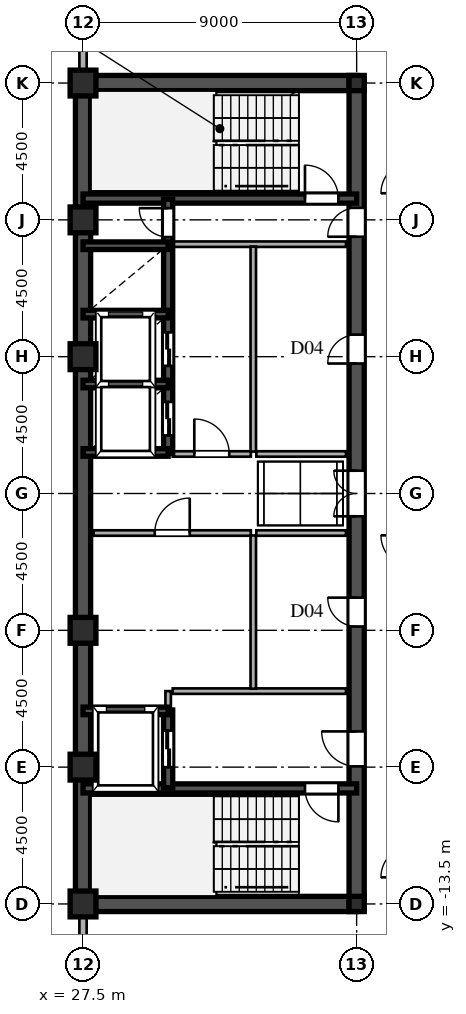
"""IFC4 building model, lengths in metres.
Left out: names, types, materials, properties, quantities, classifications, styles, units other than length and angle.
Written with IfcOpenShell. Run it as: python <this file> out.ifc"""

import sys

from ifc_helpers import new_model, si_unit, direction, frame, frame_2d, origin, origin_2d, place, context, subcontext, project, spatial, rectangle, hollow_rectangle, i_section, extrude, source, transform, mapped, element, fill, save


model = new_model("IFC4")
c1 = context("Model", 3, precision=1e-05, world=origin(), true_north=direction((0.0, 1.0)))
c2 = subcontext(c1, "Body", "Model", "MODEL_VIEW")
j1 = project(units=[si_unit("LENGTHUNIT", "METRE"), si_unit("PLANEANGLEUNIT", "RADIAN")], contexts=[c1])
p1 = place(None, origin())
s1 = spatial("IfcSite", under=j1, at=p1, CompositionType="ELEMENT")
p2 = place(p1, origin())
s2 = spatial("IfcBuilding", under=s1, at=p2, CompositionType="ELEMENT")
p3 = place(p2, frame((0.0, 0.0, 213.9)))
s3 = spatial("IfcBuildingStorey", under=s2, at=p3, CompositionType="ELEMENT", Elevation=213.9)
m1 = source(origin(), c2, "Body", "SweptSolid", [
    extrude(hollow_rectangle(XDim=0.85, YDim=0.85, WallThickness=0.036, at=origin_2d()), origin(), (0.0, 0.0, 1.0), 3.6),
])
for number, where, z_axis, x_axis in (
    (1, (27.5, -13.5, 0.0), (0.0, 0.0, 1.0), (1.0, 0.0, 0.0)),
    (2, (27.5, -9.0, 0.0), (0.0, 0.0, 1.0), (1.0, 0.0, 0.0)),
    (3, (27.5, -4.5, 0.0), (0.0, 0.0, 1.0), (1.0, 0.0, 0.0)),
    (4, (27.5, 4.5, 0.0), (0.0, 0.0, 1.0), (1.0, 0.0, 0.0)),
    (5, (27.5, 9.0, 0.0), (0.0, 0.0, 1.0), (1.0, 0.0, 0.0)),
    (6, (27.5, 13.5, 0.0), (0.0, 0.0, 1.0), (1.0, 0.0, 0.0)),
):
    element("IfcColumn", number, at=place(p3, frame(where, z_axis=z_axis, x_axis=x_axis)), inside=s3, PredefinedType="COLUMN", context=c2, shape_type="MappedRepresentation", body=[
        mapped(m1, transform((0.0, 0.0, 0.0), scale=1.0)),
    ])
m2 = source(origin(), c2, "Body", "SweptSolid", [
    extrude(i_section(OverallWidth=0.5, OverallDepth=0.5, WebThickness=0.02, FlangeThickness=0.032, at=origin_2d()), origin(), (0.0, 0.0, 1.0), 3.6),
])
for number, where, z_axis, x_axis in (
    (7, (36.5, -13.5, 0.0), (0.0, 0.0, 1.0), (1.0, 0.0, 0.0)),
    (8, (36.5, 13.5, 0.0), (0.0, 0.0, 1.0), (1.0, 0.0, 0.0)),
):
    element("IfcColumn", number, at=place(p3, frame(where, z_axis=z_axis, x_axis=x_axis)), inside=s3, PredefinedType="COLUMN", context=c2, shape_type="MappedRepresentation", body=[
        mapped(m2, transform((0.0, 0.0, 0.0), scale=1.0)),
    ])
p4 = place(p3, frame((27.5, -15.98, 0.0), z_axis=(0.0, 0.0, 1.0), x_axis=(0.0, 1.0, 0.0)))
e9 = element("IfcWall", 9, at=p4, inside=s3, PredefinedType="SOLIDWALL", context=c2, shape_type="SweptSolid", body=[
    extrude(rectangle(XDim=1.605, YDim=0.24, at=frame_2d((0.803, 0.0))), origin(), (0.0, 0.0, 1.0), 3.38),
])
for number, where, z_axis, x_axis in (
    (10, (27.5, -14.375, 0.0), (0.0, 0.0, 1.0), (0.0, 1.0, 0.0)),
    (11, (27.5, 13.755, 0.0), (0.0, 0.0, 1.0), (0.0, 1.0, 0.0)),
):
    element("IfcWall", number, at=place(p3, frame(where, z_axis=z_axis, x_axis=x_axis)), inside=s3, PredefinedType="SOLIDWALL", context=c2, shape_type="SweptSolid", body=[
        extrude(rectangle(XDim=0.62, YDim=0.24, at=frame_2d((0.31, 0.0))), origin(), (0.0, 0.0, 1.0), 2.88),
    ])
p5 = place(p3, frame((27.5, 14.375, 0.0), z_axis=(0.0, 0.0, 1.0), x_axis=(0.0, 1.0, 0.0)))
e12 = element("IfcWall", 12, at=p5, inside=s3, PredefinedType="SOLIDWALL", context=c2, shape_type="SweptSolid", body=[
    extrude(rectangle(XDim=1.605, YDim=0.24, at=frame_2d((0.803, 0.0))), origin(), (0.0, 0.0, 1.0), 3.38),
])
for number, where, z_axis, x_axis in (
    (13, (27.5, -13.5, 0.0), (0.0, 0.0, 1.0), (0.0, 1.0, 0.0)),
    (14, (27.5, 1.3, 0.0), (0.0, 0.0, 1.0), (0.0, 1.0, 0.0)),
):
    element("IfcWall", number, at=place(p3, frame(where, z_axis=z_axis, x_axis=x_axis)), inside=s3, PredefinedType="SHEAR", context=c2, shape_type="SweptSolid", body=[
        extrude(rectangle(XDim=12.2, YDim=0.5, at=frame_2d((6.1, 0.0))), origin(), (0.0, 0.0, 1.0), 3.38),
    ])
p6 = place(p3, frame((27.5, -1.3, 0.0), z_axis=(0.0, 0.0, 1.0), x_axis=(0.0, 1.0, 0.0)))
e15 = element("IfcWall", 15, at=p6, inside=s3, PredefinedType="SHEAR", context=c2, shape_type="SweptSolid", body=[
    extrude(rectangle(XDim=2.6, YDim=0.5, at=frame_2d((1.3, 0.0))), origin(), (0.0, 0.0, 1.0), 3.38),
])
for number, where, z_axis, x_axis in (
    (16, (27.5, -13.5, 0.0), (0.0, 0.0, 1.0), (1.0, 0.0, 0.0)),
    (17, (27.5, 13.5, 0.0), (0.0, 0.0, 1.0), (1.0, 0.0, 0.0)),
):
    element("IfcWall", number, at=place(p3, frame(where, z_axis=z_axis, x_axis=x_axis)), inside=s3, PredefinedType="SHEAR", context=c2, shape_type="SweptSolid", body=[
        extrude(rectangle(XDim=9.0, YDim=0.5, at=frame_2d((4.5, 0.0))), origin(), (0.0, 0.0, 1.0), 3.38),
    ])
p7 = place(p3, frame((36.5, -13.65, 0.0), z_axis=(0.0, 0.0, 1.0), x_axis=(0.0, 1.0, 0.0)))
e18 = element("IfcWall", 18, at=p7, inside=s3, PredefinedType="SHEAR", context=c2, shape_type="SweptSolid", body=[
    extrude(rectangle(XDim=7.15, YDim=0.5, at=frame_2d((3.575, 0.0))), origin(), (0.0, 0.0, 1.0), 3.38),
])
p8 = place(p7, frame((4.675, 0.0, 0.0)))
e19 = element("IfcOpeningElement", 19, at=p8, cuts=e18, PredefinedType="OPENING", context=c2, shape_type="SweptSolid", body=[
    extrude(rectangle(XDim=1.15, YDim=2.2, at=frame_2d((0.575, 1.1))), frame((0.0, 0.26, 0.0), z_axis=(0.0, -1.0, 0.0), x_axis=(1.0, 0.0, 0.0)), (0.0, 0.0, 1.0), 0.52),
])
p9 = place(p3, frame((36.5, -1.3, 0.0), z_axis=(0.0, 0.0, 1.0), x_axis=(0.0, 1.0, 0.0)))
e20 = element("IfcWall", 20, at=p9, inside=s3, PredefinedType="SHEAR", context=c2, shape_type="SweptSolid", body=[
    extrude(rectangle(XDim=2.6, YDim=0.5, at=frame_2d((1.3, 0.0))), origin(), (0.0, 0.0, 1.0), 3.38),
])
p10 = place(p9, frame((0.55, 0.0, 0.0)))
e21 = element("IfcOpeningElement", 21, at=p10, cuts=e20, PredefinedType="OPENING", context=c2, shape_type="SweptSolid", body=[
    extrude(rectangle(XDim=1.5, YDim=2.3, at=frame_2d((0.75, 1.15))), frame((0.0, 0.26, 0.0), z_axis=(0.0, -1.0, 0.0), x_axis=(1.0, 0.0, 0.0)), (0.0, 0.0, 1.0), 0.52),
])
p11 = place(p3, frame((36.5, 8.2, 0.0), z_axis=(0.0, 0.0, 1.0), x_axis=(0.0, 1.0, 0.0)))
e22 = element("IfcWall", 22, at=p11, inside=s3, PredefinedType="SHEAR", context=c2, shape_type="SweptSolid", body=[
    extrude(rectangle(XDim=5.45, YDim=0.5, at=frame_2d((2.725, 0.0))), origin(), (0.0, 0.0, 1.0), 3.38),
])
p12 = place(p11, frame((0.245, 0.0, 0.0)))
e23 = element("IfcOpeningElement", 23, at=p12, cuts=e22, PredefinedType="OPENING", context=c2, shape_type="SweptSolid", body=[
    extrude(rectangle(XDim=0.95, YDim=2.15, at=frame_2d((0.475, 1.075))), frame((0.0, 0.26, 0.0), z_axis=(0.0, -1.0, 0.0), x_axis=(1.0, 0.0, 0.0)), (0.0, 0.0, 1.0), 0.52),
])
p13 = place(p3, frame((36.5, -6.5, 0.0), z_axis=(0.0, 0.0, 1.0), x_axis=(0.0, 1.0, 0.0)))
e24 = element("IfcWall", 24, at=p13, inside=s3, PredefinedType="SHEAR", context=c2, shape_type="SweptSolid", body=[
    extrude(rectangle(XDim=5.2, YDim=0.5, at=frame_2d((2.6, 0.0))), origin(), (0.0, 0.0, 1.0), 3.38),
])
p14 = place(p13, frame((2.125, 0.0, 0.0)))
e25 = element("IfcOpeningElement", 25, at=p14, cuts=e24, PredefinedType="OPENING", context=c2, shape_type="SweptSolid", body=[
    extrude(rectangle(XDim=0.95, YDim=2.15, at=frame_2d((0.475, 1.075))), frame((0.0, 0.26, 0.0), z_axis=(0.0, -1.0, 0.0), x_axis=(1.0, 0.0, 0.0)), (0.0, 0.0, 1.0), 0.52),
])
p15 = place(p3, frame((36.5, 1.3, 0.0), z_axis=(0.0, 0.0, 1.0), x_axis=(0.0, 1.0, 0.0)))
e26 = element("IfcWall", 26, at=p15, inside=s3, PredefinedType="SHEAR", context=c2, shape_type="SweptSolid", body=[
    extrude(rectangle(XDim=6.9, YDim=0.5, at=frame_2d((3.45, 0.0))), origin(), (0.0, 0.0, 1.0), 3.38),
])
p16 = place(p15, frame((2.975, 0.0, 0.0)))
e27 = element("IfcOpeningElement", 27, at=p16, cuts=e26, PredefinedType="OPENING", context=c2, shape_type="SweptSolid", body=[
    extrude(rectangle(XDim=0.95, YDim=2.15, at=frame_2d((0.475, 1.075))), frame((0.0, 0.26, 0.0), z_axis=(0.0, -1.0, 0.0), x_axis=(1.0, 0.0, 0.0)), (0.0, 0.0, 1.0), 0.52),
])
p17 = place(p3, frame((27.5, -9.7, 0.0), z_axis=(0.0, 0.0, 1.0), x_axis=(1.0, 0.0, 0.0)))
e28 = element("IfcWall", 28, at=p17, inside=s3, PredefinedType="SHEAR", context=c2, shape_type="SweptSolid", body=[
    extrude(rectangle(XDim=9.0, YDim=0.3, at=frame_2d((4.5, 0.0))), origin(), (0.0, 0.0, 1.0), 3.38),
])
p18 = place(p17, frame((7.3, 0.0, 0.0)))
e29 = element("IfcOpeningElement", 29, at=p18, cuts=e28, PredefinedType="OPENING", context=c2, shape_type="SweptSolid", body=[
    extrude(rectangle(XDim=1.1, YDim=2.2, at=frame_2d((0.55, 1.1))), frame((0.0, 0.16, 0.0), z_axis=(0.0, -1.0, 0.0), x_axis=(1.0, 0.0, 0.0)), (0.0, 0.0, 1.0), 0.32),
])
p19 = place(p3, frame((27.5, 9.7, 0.0), z_axis=(0.0, 0.0, 1.0), x_axis=(1.0, 0.0, 0.0)))
e30 = element("IfcWall", 30, at=p19, inside=s3, PredefinedType="SHEAR", context=c2, shape_type="SweptSolid", body=[
    extrude(rectangle(XDim=9.0, YDim=0.3, at=frame_2d((4.5, 0.0))), origin(), (0.0, 0.0, 1.0), 3.38),
])
p20 = place(p19, frame((7.3, 0.0, 0.0)))
e31 = element("IfcOpeningElement", 31, at=p20, cuts=e30, PredefinedType="OPENING", context=c2, shape_type="SweptSolid", body=[
    extrude(rectangle(XDim=1.1, YDim=2.2, at=frame_2d((0.55, 1.1))), frame((0.0, 0.16, 0.0), z_axis=(0.0, -1.0, 0.0), x_axis=(1.0, 0.0, 0.0)), (0.0, 0.0, 1.0), 0.32),
])
for number, where, z_axis, x_axis in (
    (32, (27.5, -7.15, 0.0), (0.0, 0.0, 1.0), (1.0, 0.0, 0.0)),
    (33, (27.5, 1.35, 0.0), (0.0, 0.0, 1.0), (1.0, 0.0, 0.0)),
    (34, (27.5, 3.6, 0.0), (0.0, 0.0, 1.0), (1.0, 0.0, 0.0)),
    (35, (27.5, 5.9, 0.0), (0.0, 0.0, 1.0), (1.0, 0.0, 0.0)),
    (36, (27.5, 8.15, 0.0), (0.0, 0.0, 1.0), (1.0, 0.0, 0.0)),
):
    element("IfcWall", number, at=place(p3, frame(where, z_axis=z_axis, x_axis=x_axis)), inside=s3, PredefinedType="SHEAR", context=c2, shape_type="SweptSolid", body=[
        extrude(rectangle(XDim=2.8, YDim=0.25, at=frame_2d((1.4, 0.0))), origin(), (0.0, 0.0, 1.0), 3.38),
    ])
p21 = place(p3, frame((30.3, -9.68, 0.0), z_axis=(0.0, 0.0, 1.0), x_axis=(0.0, 1.0, 0.0)))
e37 = element("IfcWall", 37, at=p21, inside=s3, PredefinedType="SHEAR", context=c2, shape_type="SweptSolid", body=[
    extrude(rectangle(XDim=2.56, YDim=0.3, at=frame_2d((1.28, 0.0))), origin(), (0.0, 0.0, 1.0), 3.38),
])
p22 = place(p21, frame((0.68, 0.0, 0.0)))
e38 = element("IfcOpeningElement", 38, at=p22, cuts=e37, PredefinedType="OPENING", context=c2, shape_type="SweptSolid", body=[
    extrude(rectangle(XDim=1.2, YDim=2.25, at=frame_2d((0.6, 1.125))), frame((0.0, 0.16, 0.0), z_axis=(0.0, -1.0, 0.0), x_axis=(1.0, 0.0, 0.0)), (0.0, 0.0, 1.0), 0.32),
])
p23 = place(p3, frame((30.3, 1.32, 0.0), z_axis=(0.0, 0.0, 1.0), x_axis=(0.0, 1.0, 0.0)))
e39 = element("IfcWall", 39, at=p23, inside=s3, PredefinedType="SHEAR", context=c2, shape_type="SweptSolid", body=[
    extrude(rectangle(XDim=2.28, YDim=0.3, at=frame_2d((1.14, 0.0))), origin(), (0.0, 0.0, 1.0), 3.38),
])
p24 = place(p23, frame((0.59, 0.0, 0.0)))
e40 = element("IfcOpeningElement", 40, at=p24, cuts=e39, PredefinedType="OPENING", context=c2, shape_type="SweptSolid", body=[
    extrude(rectangle(XDim=1.1, YDim=2.2, at=frame_2d((0.55, 1.1))), frame((0.0, 0.16, 0.0), z_axis=(0.0, -1.0, 0.0), x_axis=(1.0, 0.0, 0.0)), (0.0, 0.0, 1.0), 0.32),
])
p25 = place(p3, frame((30.3, 3.6, 0.0), z_axis=(0.0, 0.0, 1.0), x_axis=(0.0, 1.0, 0.0)))
e41 = element("IfcWall", 41, at=p25, inside=s3, PredefinedType="SHEAR", context=c2, shape_type="SweptSolid", body=[
    extrude(rectangle(XDim=2.3, YDim=0.3, at=frame_2d((1.15, 0.0))), origin(), (0.0, 0.0, 1.0), 3.38),
])
p26 = place(p25, frame((0.6, 0.0, 0.0)))
e42 = element("IfcOpeningElement", 42, at=p26, cuts=e41, PredefinedType="OPENING", context=c2, shape_type="SweptSolid", body=[
    extrude(rectangle(XDim=1.1, YDim=2.2, at=frame_2d((0.55, 1.1))), frame((0.0, 0.16, 0.0), z_axis=(0.0, -1.0, 0.0), x_axis=(1.0, 0.0, 0.0)), (0.0, 0.0, 1.0), 0.32),
])
p27 = place(p3, frame((30.3, 5.9, 0.0), z_axis=(0.0, 0.0, 1.0), x_axis=(0.0, 1.0, 0.0)))
e43 = element("IfcWall", 43, at=p27, inside=s3, PredefinedType="SHEAR", context=c2, shape_type="SweptSolid", body=[
    extrude(rectangle(XDim=2.25, YDim=0.3, at=frame_2d((1.125, 0.0))), origin(), (0.0, 0.0, 1.0), 3.38),
])
p28 = place(p3, frame((30.3, 8.15, 0.0), z_axis=(0.0, 0.0, 1.0), x_axis=(0.0, 1.0, 0.0)))
e44 = element("IfcWall", 44, at=p28, inside=s3, PredefinedType="SHEAR", context=c2, shape_type="SweptSolid", body=[
    extrude(rectangle(XDim=1.53, YDim=0.3, at=frame_2d((0.765, 0.0))), origin(), (0.0, 0.0, 1.0), 3.38),
])
p29 = place(p28, frame((0.285, 0.0, 0.0)))
e45 = element("IfcOpeningElement", 45, at=p29, cuts=e44, PredefinedType="OPENING", context=c2, shape_type="SweptSolid", body=[
    extrude(rectangle(XDim=0.95, YDim=2.15, at=frame_2d((0.475, 1.075))), frame((0.0, 0.16, 0.0), z_axis=(0.0, -1.0, 0.0), x_axis=(1.0, 0.0, 0.0)), (0.0, 0.0, 1.0), 0.32),
])
p30 = place(p3, frame((30.45, -6.5, 0.0), z_axis=(0.0, 0.0, 1.0), x_axis=(1.0, 0.0, 0.0)))
e46 = element("IfcWall", 46, at=p30, inside=s3, PredefinedType="PARTITIONING", context=c2, shape_type="SweptSolid", body=[
    extrude(rectangle(XDim=5.7, YDim=0.18, at=frame_2d((2.85, 0.0))), origin(), (0.0, 0.0, 1.0), 3.38),
])
p31 = place(p3, frame((30.3, -7.12, 0.0), z_axis=(0.0, 0.0, 1.0), x_axis=(0.0, 1.0, 0.0)))
e47 = element("IfcWall", 47, at=p31, inside=s3, PredefinedType="PARTITIONING", context=c2, shape_type="SweptSolid", body=[
    extrude(rectangle(XDim=0.62, YDim=0.18, at=frame_2d((0.31, 0.0))), origin(), (0.0, 0.0, 1.0), 3.38),
])
p32 = place(p3, frame((30.45, 8.2, 0.0), z_axis=(0.0, 0.0, 1.0), x_axis=(1.0, 0.0, 0.0)))
e48 = element("IfcWall", 48, at=p32, inside=s3, PredefinedType="PARTITIONING", context=c2, shape_type="SweptSolid", body=[
    extrude(rectangle(XDim=5.7, YDim=0.18, at=frame_2d((2.85, 0.0))), origin(), (0.0, 0.0, 1.0), 3.38),
])
p33 = place(p3, frame((33.1, -6.42, 0.0), z_axis=(0.0, 0.0, 1.0), x_axis=(0.0, 1.0, 0.0)))
e49 = element("IfcWall", 49, at=p33, inside=s3, PredefinedType="PARTITIONING", context=c2, shape_type="SweptSolid", body=[
    extrude(rectangle(XDim=5.04, YDim=0.18, at=frame_2d((2.52, 0.0))), origin(), (0.0, 0.0, 1.0), 3.38),
])
p34 = place(p3, frame((33.1, 1.38, 0.0), z_axis=(0.0, 0.0, 1.0), x_axis=(0.0, 1.0, 0.0)))
e50 = element("IfcWall", 50, at=p34, inside=s3, PredefinedType="PARTITIONING", context=c2, shape_type="SweptSolid", body=[
    extrude(rectangle(XDim=6.74, YDim=0.18, at=frame_2d((3.37, 0.0))), origin(), (0.0, 0.0, 1.0), 3.38),
])
p35 = place(p3, frame((27.85, -1.3, 0.0), z_axis=(0.0, 0.0, 1.0), x_axis=(1.0, 0.0, 0.0)))
e51 = element("IfcWall", 51, at=p35, inside=s3, PredefinedType="PARTITIONING", context=c2, shape_type="SweptSolid", body=[
    extrude(rectangle(XDim=5.17, YDim=0.18, at=frame_2d((2.585, 0.0))), origin(), (0.0, 0.0, 1.0), 3.38),
])
p36 = place(p35, frame((2.01, 0.0, 0.0)))
e52 = element("IfcOpeningElement", 52, at=p36, cuts=e51, PredefinedType="OPENING", context=c2, shape_type="SweptSolid", body=[
    extrude(rectangle(XDim=1.15, YDim=2.2, at=frame_2d((0.575, 1.1))), frame((0.0, 0.1, 0.0), z_axis=(0.0, -1.0, 0.0), x_axis=(1.0, 0.0, 0.0)), (0.0, 0.0, 1.0), 0.2),
])
p37 = place(p3, frame((30.45, 1.3, 0.0), z_axis=(0.0, 0.0, 1.0), x_axis=(1.0, 0.0, 0.0)))
e53 = element("IfcWall", 53, at=p37, inside=s3, PredefinedType="PARTITIONING", context=c2, shape_type="SweptSolid", body=[
    extrude(rectangle(XDim=2.57, YDim=0.18, at=frame_2d((1.285, 0.0))), origin(), (0.0, 0.0, 1.0), 3.38),
])
p38 = place(p37, frame((0.71, 0.0, 0.0)))
e54 = element("IfcOpeningElement", 54, at=p38, cuts=e53, PredefinedType="OPENING", context=c2, shape_type="SweptSolid", body=[
    extrude(rectangle(XDim=1.15, YDim=2.2, at=frame_2d((0.575, 1.1))), frame((0.0, 0.1, 0.0), z_axis=(0.0, -1.0, 0.0), x_axis=(1.0, 0.0, 0.0)), (0.0, 0.0, 1.0), 0.2),
])
for number, where, z_axis, x_axis in (
    (55, (33.2, -1.3, 0.0), (0.0, 0.0, 1.0), (1.0, 0.0, 0.0)),
    (56, (33.2, 1.3, 0.0), (0.0, 0.0, 1.0), (1.0, 0.0, 0.0)),
):
    element("IfcWall", number, at=place(p3, frame(where, z_axis=z_axis, x_axis=x_axis)), inside=s3, PredefinedType="PARTITIONING", context=c2, shape_type="SweptSolid", body=[
        extrude(rectangle(XDim=2.95, YDim=0.18, at=frame_2d((1.475, 0.0))), origin(), (0.0, 0.0, 1.0), 3.38),
    ])
m3 = source(origin(), c2, "Body", "SweptSolid", [
    extrude(rectangle(XDim=1.15, YDim=2.2, at=frame_2d((0.575, 1.1))), frame((0.0, 0.025, 0.0), z_axis=(0.0, -1.0, 0.0), x_axis=(1.0, 0.0, 0.0)), (0.0, 0.0, 1.0), 0.05),
])
p39 = place(p8, origin())
e57 = element("IfcDoor", 57, at=p39, inside=s3, OperationType="SINGLE_SWING_RIGHT", PredefinedType="DOOR", context=c2, shape_type="MappedRepresentation", body=[
    mapped(m3, transform((0.0, 0.0, 0.0), scale=1.0)),
])
fill(e19, e57)
m4 = source(origin(), c2, "Body", "SweptSolid", [
    extrude(rectangle(XDim=1.5, YDim=2.3, at=frame_2d((0.75, 1.15))), frame((0.0, 0.025, 0.0), z_axis=(0.0, -1.0, 0.0), x_axis=(1.0, 0.0, 0.0)), (0.0, 0.0, 1.0), 0.05),
])
p40 = place(p10, origin())
e58 = element("IfcDoor", 58, at=p40, inside=s3, OperationType="DOUBLE_SWING_LEFT", PredefinedType="DOOR", context=c2, shape_type="MappedRepresentation", body=[
    mapped(m4, transform((0.0, 0.0, 0.0), scale=1.0)),
])
fill(e21, e58)
m5 = source(origin(), c2, "Body", "SweptSolid", [
    extrude(rectangle(XDim=0.95, YDim=2.15, at=frame_2d((0.475, 1.075))), frame((0.0, 0.025, 0.0), z_axis=(0.0, -1.0, 0.0), x_axis=(1.0, 0.0, 0.0)), (0.0, 0.0, 1.0), 0.05),
])
p41 = place(p12, origin())
e59 = element("IfcDoor", 59, at=p41, inside=s3, OperationType="SINGLE_SWING_LEFT", PredefinedType="DOOR", context=c2, shape_type="MappedRepresentation", body=[
    mapped(m5, transform((0.0, 0.0, 0.0), scale=1.0)),
])
fill(e23, e59)
p42 = place(p14, origin())
e60 = element("IfcDoor", 60, at=p42, inside=s3, OperationType="SINGLE_SWING_RIGHT", PredefinedType="DOOR", context=c2, shape_type="MappedRepresentation", body=[
    mapped(m5, transform((0.0, 0.0, 0.0), scale=1.0)),
])
fill(e25, e60)
p43 = place(p16, origin())
e61 = element("IfcDoor", 61, at=p43, inside=s3, OperationType="SINGLE_SWING_LEFT", PredefinedType="DOOR", context=c2, shape_type="MappedRepresentation", body=[
    mapped(m5, transform((0.0, 0.0, 0.0), scale=1.0)),
])
fill(e27, e61)
m6 = source(origin(), c2, "Body", "SweptSolid", [
    extrude(rectangle(XDim=1.1, YDim=2.2, at=frame_2d((0.55, 1.1))), frame((0.0, 0.025, 0.0), z_axis=(0.0, -1.0, 0.0), x_axis=(1.0, 0.0, 0.0)), (0.0, 0.0, 1.0), 0.05),
])
p44 = place(p18, frame((1.1, 0.0, 0.0), z_axis=(0.0, 0.0, 1.0), x_axis=(-1.0, 0.0, 0.0)))
e62 = element("IfcDoor", 62, at=p44, inside=s3, OperationType="SINGLE_SWING_RIGHT", PredefinedType="DOOR", context=c2, shape_type="MappedRepresentation", body=[
    mapped(m6, transform((0.0, 0.0, 0.0), scale=1.0)),
])
fill(e29, e62)
p45 = place(p20, origin())
e63 = element("IfcDoor", 63, at=p45, inside=s3, OperationType="SINGLE_SWING_LEFT", PredefinedType="DOOR", context=c2, shape_type="MappedRepresentation", body=[
    mapped(m6, transform((0.0, 0.0, 0.0), scale=1.0)),
])
fill(e31, e63)
m7 = source(origin(), c2, "Body", "SweptSolid", [
    extrude(rectangle(XDim=1.2, YDim=2.25, at=frame_2d((0.6, 1.125))), frame((0.0, 0.025, 0.0), z_axis=(0.0, -1.0, 0.0), x_axis=(1.0, 0.0, 0.0)), (0.0, 0.0, 1.0), 0.05),
])
p46 = place(p22, origin())
e64 = element("IfcDoor", 64, at=p46, inside=s3, OperationType="DOUBLE_DOOR_SLIDING", PredefinedType="DOOR", context=c2, shape_type="MappedRepresentation", body=[
    mapped(m7, transform((0.0, 0.0, 0.0), scale=1.0)),
])
fill(e38, e64)
m8 = source(origin(), c2, "Body", "SweptSolid", [
    extrude(rectangle(XDim=1.1, YDim=2.2, at=frame_2d((0.55, 1.1))), frame((0.0, 0.025, 0.0), z_axis=(0.0, -1.0, 0.0), x_axis=(1.0, 0.0, 0.0)), (0.0, 0.0, 1.0), 0.05),
])
p47 = place(p24, origin())
e65 = element("IfcDoor", 65, at=p47, inside=s3, OperationType="DOUBLE_DOOR_SLIDING", PredefinedType="DOOR", context=c2, shape_type="MappedRepresentation", body=[
    mapped(m8, transform((0.0, 0.0, 0.0), scale=1.0)),
])
fill(e40, e65)
p48 = place(p26, origin())
e66 = element("IfcDoor", 66, at=p48, inside=s3, OperationType="DOUBLE_DOOR_SLIDING", PredefinedType="DOOR", context=c2, shape_type="MappedRepresentation", body=[
    mapped(m8, transform((0.0, 0.0, 0.0), scale=1.0)),
])
fill(e42, e66)
p49 = place(p29, origin())
e67 = element("IfcDoor", 67, at=p49, inside=s3, OperationType="SINGLE_SWING_RIGHT", PredefinedType="DOOR", context=c2, shape_type="MappedRepresentation", body=[
    mapped(m5, transform((0.0, 0.0, 0.0), scale=1.0)),
])
fill(e45, e67)
p50 = place(p36, origin())
e68 = element("IfcDoor", 68, at=p50, inside=s3, OperationType="SINGLE_SWING_RIGHT", PredefinedType="DOOR", context=c2, shape_type="MappedRepresentation", body=[
    mapped(m3, transform((0.0, 0.0, 0.0), scale=1.0)),
])
fill(e52, e68)
p51 = place(p38, origin())
e69 = element("IfcDoor", 69, at=p51, inside=s3, OperationType="SINGLE_SWING_LEFT", PredefinedType="DOOR", context=c2, shape_type="MappedRepresentation", body=[
    mapped(m3, transform((0.0, 0.0, 0.0), scale=1.0)),
])
fill(e54, e69)
save(model, sys.argv[1])
